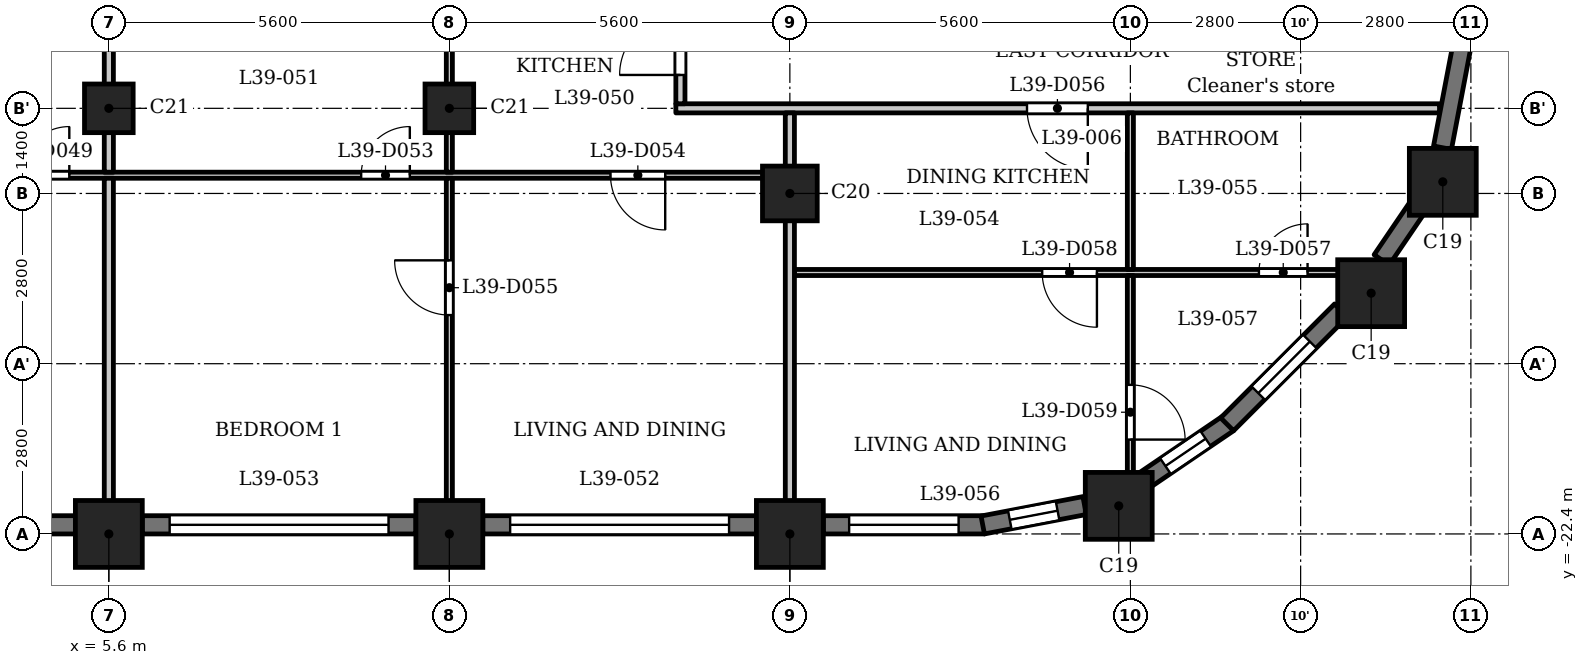
"""IFC4 building model, lengths in metres.
Left out: names, types, materials, properties, quantities, classifications, styles, units other than length and angle.
Written with IfcOpenShell. Run it as: python <this file> out.ifc"""

import sys

from ifc_helpers import new_model, si_unit, direction, frame, frame_2d, origin, origin_2d, place, context, subcontext, project, spatial, rectangle, extrude, element, fill, save


model = new_model("IFC4")
c1 = context("Model", 3, precision=1e-05, world=origin(), true_north=direction((0.0, 1.0)))
c2 = subcontext(c1, "Body", "Model", "MODEL_VIEW")
j1 = project(units=[si_unit("LENGTHUNIT", "METRE"), si_unit("PLANEANGLEUNIT", "RADIAN")], contexts=[c1])
p1 = place(None, origin())
s1 = spatial("IfcSite", under=j1, at=p1, CompositionType="ELEMENT")
p2 = place(p1, origin())
s2 = spatial("IfcBuilding", under=s1, at=p2, CompositionType="ELEMENT")
p3 = place(p2, frame((0.0, 0.0, 153.6)))
s3 = spatial("IfcBuildingStorey", under=s2, at=p3, CompositionType="ELEMENT", Elevation=153.6)
for number, where, z_axis, x_axis in (
    (1, (5.6, -22.4, 0.0), (0.0, 0.0, 1.0), (1.0, 0.0, 0.0)),
    (2, (11.2, -22.4, 0.0), (0.0, 0.0, 1.0), (1.0, 0.0, 0.0)),
    (3, (16.8, -22.4, 0.0), (0.0, 0.0, 1.0), (1.0, 0.0, 0.0)),
    (4, (22.209, -21.938, 0.0), (0.0, 0.0, 1.0), (1.0, 0.0, 0.0)),
    (5, (26.36, -18.44, 0.0), (0.0, 0.0, 1.0), (1.0, 0.0, 0.0)),
    (6, (27.538, -16.609, 0.0), (0.0, 0.0, 1.0), (1.0, 0.0, 0.0)),
):
    element("IfcColumn", number, at=place(p3, frame(where, z_axis=z_axis, x_axis=x_axis)), inside=s3, PredefinedType="COLUMN", context=c2, shape_type="SweptSolid", body=[
        extrude(rectangle(XDim=1.1, YDim=1.1, at=origin_2d()), origin(), (0.0, 0.0, 1.0), 3.5),
    ])
p4 = place(p3, frame((16.8, -16.8, 0.0), z_axis=(0.0, 0.0, 1.0), x_axis=(1.0, 0.0, 0.0)))
e7 = element("IfcColumn", 7, at=p4, inside=s3, PredefinedType="COLUMN", context=c2, shape_type="SweptSolid", body=[
    extrude(rectangle(XDim=0.9, YDim=0.9, at=origin_2d()), origin(), (0.0, 0.0, 1.0), 3.5),
])
for number, where, z_axis, x_axis in (
    (8, (5.6, -15.4, 0.0), (0.0, 0.0, 1.0), (1.0, 0.0, 0.0)),
    (9, (11.2, -15.4, 0.0), (0.0, 0.0, 1.0), (1.0, 0.0, 0.0)),
):
    element("IfcColumn", number, at=place(p3, frame(where, z_axis=z_axis, x_axis=x_axis)), inside=s3, PredefinedType="COLUMN", context=c2, shape_type="SweptSolid", body=[
        extrude(rectangle(XDim=0.8, YDim=0.8, at=origin_2d()), origin(), (0.0, 0.0, 1.0), 3.5),
    ])
p5 = place(p3, frame((0.55, -22.25, 0.0), z_axis=(0.0, 0.0, 1.0), x_axis=(1.0, 0.0, 0.0)))
e10 = element("IfcWall", 10, at=p5, inside=s3, PredefinedType="SOLIDWALL", context=c2, shape_type="SweptSolid", body=[
    extrude(rectangle(XDim=4.5, YDim=0.3, at=frame_2d((2.25, 0.0))), origin(), (0.0, 0.0, 1.0), 2.45),
])
p6 = place(p5, frame((0.45, 0.0, 1.2)))
e11 = element("IfcOpeningElement", 11, at=p6, cuts=e10, PredefinedType="OPENING", context=c2, shape_type="SweptSolid", body=[
    extrude(rectangle(XDim=3.6, YDim=0.95, at=frame_2d((1.8, 0.475))), frame((0.0, 0.16, 0.0), z_axis=(0.0, -1.0, 0.0), x_axis=(1.0, 0.0, 0.0)), (0.0, 0.0, 1.0), 0.32),
])
p7 = place(p3, frame((6.15, -22.25, 0.0), z_axis=(0.0, 0.0, 1.0), x_axis=(1.0, 0.0, 0.0)))
e12 = element("IfcWall", 12, at=p7, inside=s3, PredefinedType="SOLIDWALL", context=c2, shape_type="SweptSolid", body=[
    extrude(rectangle(XDim=4.5, YDim=0.3, at=frame_2d((2.25, 0.0))), origin(), (0.0, 0.0, 1.0), 2.45),
])
p8 = place(p7, frame((0.45, 0.0, 1.2)))
e13 = element("IfcOpeningElement", 13, at=p8, cuts=e12, PredefinedType="OPENING", context=c2, shape_type="SweptSolid", body=[
    extrude(rectangle(XDim=3.6, YDim=0.95, at=frame_2d((1.8, 0.475))), frame((0.0, 0.16, 0.0), z_axis=(0.0, -1.0, 0.0), x_axis=(1.0, 0.0, 0.0)), (0.0, 0.0, 1.0), 0.32),
])
p9 = place(p3, frame((11.75, -22.25, 0.0), z_axis=(0.0, 0.0, 1.0), x_axis=(1.0, 0.0, 0.0)))
e14 = element("IfcWall", 14, at=p9, inside=s3, PredefinedType="SOLIDWALL", context=c2, shape_type="SweptSolid", body=[
    extrude(rectangle(XDim=4.5, YDim=0.3, at=frame_2d((2.25, 0.0))), origin(), (0.0, 0.0, 1.0), 2.45),
])
p10 = place(p9, frame((0.45, 0.0, 1.2)))
e15 = element("IfcOpeningElement", 15, at=p10, cuts=e14, PredefinedType="OPENING", context=c2, shape_type="SweptSolid", body=[
    extrude(rectangle(XDim=3.6, YDim=0.95, at=frame_2d((1.8, 0.475))), frame((0.0, 0.16, 0.0), z_axis=(0.0, -1.0, 0.0), x_axis=(1.0, 0.0, 0.0)), (0.0, 0.0, 1.0), 0.32),
])
p11 = place(p3, frame((17.35, -22.25, 0.0), z_axis=(0.0, 0.0, 1.0), x_axis=(1.0, 0.0, 0.0)))
e16 = element("IfcWall", 16, at=p11, inside=s3, PredefinedType="SOLIDWALL", context=c2, shape_type="SweptSolid", body=[
    extrude(rectangle(XDim=2.65, YDim=0.3, at=frame_2d((1.325, 0.0))), origin(), (0.0, 0.0, 1.0), 2.45),
])
p12 = place(p11, frame((0.425, 0.0, 0.9)))
e17 = element("IfcOpeningElement", 17, at=p12, cuts=e16, PredefinedType="OPENING", context=c2, shape_type="SweptSolid", body=[
    extrude(rectangle(XDim=1.8, YDim=1.25, at=frame_2d((0.9, 0.625))), frame((0.0, 0.16, 0.0), z_axis=(0.0, -1.0, 0.0), x_axis=(1.0, 0.0, 0.0)), (0.0, 0.0, 1.0), 0.32),
])
p13 = place(p3, frame((19.972, -22.253, 0.0), z_axis=(0.0, 0.0, 1.0), x_axis=(0.982297206936, 0.187329114784, 0.0)))
e18 = element("IfcWall", 18, at=p13, inside=s3, PredefinedType="SOLIDWALL", context=c2, shape_type="SweptSolid", body=[
    extrude(rectangle(XDim=1.706, YDim=0.3, at=frame_2d((0.853, 0.0))), origin(), (0.0, 0.0, 1.0), 2.45),
])
p14 = place(p13, frame((0.453, 0.0, 0.6)))
e19 = element("IfcOpeningElement", 19, at=p14, cuts=e18, PredefinedType="OPENING", context=c2, shape_type="SweptSolid", body=[
    extrude(rectangle(XDim=0.8, YDim=1.55, at=frame_2d((0.4, 0.775))), frame((0.0, 0.16, 0.0), z_axis=(0.0, -1.0, 0.0), x_axis=(1.0, 0.0, 0.0)), (0.0, 0.0, 1.0), 0.32),
])
p15 = place(p3, frame((22.602, -21.538, 0.0), z_axis=(0.0, 0.0, 1.0), x_axis=(0.827040942766, 0.562141689424, 0.0)))
e20 = element("IfcWall", 20, at=p15, inside=s3, PredefinedType="SOLIDWALL", context=c2, shape_type="SweptSolid", body=[
    extrude(rectangle(XDim=1.706, YDim=0.3, at=frame_2d((0.853, 0.0))), origin(), (0.0, 0.0, 1.0), 2.45),
])
p16 = place(p15, frame((0.453, 0.0, 0.6)))
e21 = element("IfcOpeningElement", 21, at=p16, cuts=e20, PredefinedType="OPENING", context=c2, shape_type="SweptSolid", body=[
    extrude(rectangle(XDim=0.8, YDim=1.55, at=frame_2d((0.4, 0.775))), frame((0.0, 0.16, 0.0), z_axis=(0.0, -1.0, 0.0), x_axis=(1.0, 0.0, 0.0)), (0.0, 0.0, 1.0), 0.32),
])
p17 = place(p3, frame((23.991, -20.597, 0.0), z_axis=(0.0, 0.0, 1.0), x_axis=(0.707106781187, 0.707106781187, 0.0)))
e22 = element("IfcWall", 22, at=p17, inside=s3, PredefinedType="SOLIDWALL", context=c2, shape_type="SweptSolid", body=[
    extrude(rectangle(XDim=2.65, YDim=0.3, at=frame_2d((1.325, 0.0))), origin(), (0.0, 0.0, 1.0), 2.45),
])
p18 = place(p17, frame((0.725, 0.0, 0.6)))
e23 = element("IfcOpeningElement", 23, at=p18, cuts=e22, PredefinedType="OPENING", context=c2, shape_type="SweptSolid", body=[
    extrude(rectangle(XDim=1.2, YDim=1.55, at=frame_2d((0.6, 0.775))), frame((0.0, 0.16, 0.0), z_axis=(0.0, -1.0, 0.0), x_axis=(1.0, 0.0, 0.0)), (0.0, 0.0, 1.0), 0.32),
])
p19 = place(p3, frame((26.532, -17.893, 0.0), z_axis=(0.0, 0.0, 1.0), x_axis=(0.562105419172, 0.82706559458, 0.0)))
e24 = element("IfcWall", 24, at=p19, inside=s3, PredefinedType="SOLIDWALL", context=c2, shape_type="SweptSolid", body=[
    extrude(rectangle(XDim=1.077, YDim=0.3, at=frame_2d((0.539, 0.0))), origin(), (0.0, 0.0, 1.0), 3.2),
])
p20 = place(p3, frame((27.533, -16.048, 0.0), z_axis=(0.0, 0.0, 1.0), x_axis=(0.187302784601, 0.982302227871, 0.0)))
e25 = element("IfcWall", 25, at=p20, inside=s3, PredefinedType="SOLIDWALL", context=c2, shape_type="SweptSolid", body=[
    extrude(rectangle(XDim=1.706, YDim=0.3, at=frame_2d((0.853, 0.0))), origin(), (0.0, 0.0, 1.0), 2.45),
])
p21 = place(p3, frame((16.875, -18.1, 0.0), z_axis=(0.0, 0.0, 1.0), x_axis=(1.0, 0.0, 0.0)))
e26 = element("IfcWall", 26, at=p21, inside=s3, PredefinedType="PARTITIONING", context=c2, shape_type="SweptSolid", body=[
    extrude(rectangle(XDim=9.565, YDim=0.1, at=frame_2d((4.782, 0.0))), origin(), (0.0, 0.0, 1.0), 3.2),
])
p22 = place(p21, frame((7.639, 0.0, 0.0)))
e27 = element("IfcOpeningElement", 27, at=p22, cuts=e26, PredefinedType="OPENING", context=c2, shape_type="SweptSolid", body=[
    extrude(rectangle(XDim=0.8, YDim=2.1, at=frame_2d((0.4, 1.05))), frame((0.0, 0.06, 0.0), z_axis=(0.0, -1.0, 0.0), x_axis=(1.0, 0.0, 0.0)), (0.0, 0.0, 1.0), 0.12),
])
p23 = place(p21, frame((4.075, 0.0, 0.0)))
e28 = element("IfcOpeningElement", 28, at=p23, cuts=e26, PredefinedType="OPENING", context=c2, shape_type="SweptSolid", body=[
    extrude(rectangle(XDim=0.9, YDim=2.1, at=frame_2d((0.45, 1.05))), frame((0.0, 0.06, 0.0), z_axis=(0.0, -1.0, 0.0), x_axis=(1.0, 0.0, 0.0)), (0.0, 0.0, 1.0), 0.12),
])
p24 = place(p3, frame((-16.725, -16.5, 0.0), z_axis=(0.0, 0.0, 1.0), x_axis=(1.0, 0.0, 0.0)))
e29 = element("IfcWall", 29, at=p24, inside=s3, PredefinedType="PARTITIONING", context=c2, shape_type="SweptSolid", body=[
    extrude(rectangle(XDim=33.45, YDim=0.1, at=frame_2d((16.725, 0.0))), origin(), (0.0, 0.0, 1.0), 3.2),
])
p25 = place(p24, frame((9.675, 0.0, 0.0)))
e30 = element("IfcOpeningElement", 30, at=p25, cuts=e29, PredefinedType="OPENING", context=c2, shape_type="SweptSolid", body=[
    extrude(rectangle(XDim=0.8, YDim=2.1, at=frame_2d((0.4, 1.05))), frame((0.0, 0.06, 0.0), z_axis=(0.0, -1.0, 0.0), x_axis=(1.0, 0.0, 0.0)), (0.0, 0.0, 1.0), 0.12),
])
p26 = place(p24, frame((4.075, 0.0, 0.0)))
e31 = element("IfcOpeningElement", 31, at=p26, cuts=e29, PredefinedType="OPENING", context=c2, shape_type="SweptSolid", body=[
    extrude(rectangle(XDim=0.9, YDim=2.1, at=frame_2d((0.45, 1.05))), frame((0.0, 0.06, 0.0), z_axis=(0.0, -1.0, 0.0), x_axis=(1.0, 0.0, 0.0)), (0.0, 0.0, 1.0), 0.12),
])
p27 = place(p24, frame((20.875, 0.0, 0.0)))
e32 = element("IfcOpeningElement", 32, at=p27, cuts=e29, PredefinedType="OPENING", context=c2, shape_type="SweptSolid", body=[
    extrude(rectangle(XDim=0.8, YDim=2.1, at=frame_2d((0.4, 1.05))), frame((0.0, 0.06, 0.0), z_axis=(0.0, -1.0, 0.0), x_axis=(1.0, 0.0, 0.0)), (0.0, 0.0, 1.0), 0.12),
])
p28 = place(p24, frame((15.275, 0.0, 0.0)))
e33 = element("IfcOpeningElement", 33, at=p28, cuts=e29, PredefinedType="OPENING", context=c2, shape_type="SweptSolid", body=[
    extrude(rectangle(XDim=0.9, YDim=2.1, at=frame_2d((0.45, 1.05))), frame((0.0, 0.06, 0.0), z_axis=(0.0, -1.0, 0.0), x_axis=(1.0, 0.0, 0.0)), (0.0, 0.0, 1.0), 0.12),
])
p29 = place(p24, frame((26.475, 0.0, 0.0)))
e34 = element("IfcOpeningElement", 34, at=p29, cuts=e29, PredefinedType="OPENING", context=c2, shape_type="SweptSolid", body=[
    extrude(rectangle(XDim=0.8, YDim=2.1, at=frame_2d((0.4, 1.05))), frame((0.0, 0.06, 0.0), z_axis=(0.0, -1.0, 0.0), x_axis=(1.0, 0.0, 0.0)), (0.0, 0.0, 1.0), 0.12),
])
p30 = place(p24, frame((30.575, 0.0, 0.0)))
e35 = element("IfcOpeningElement", 35, at=p30, cuts=e29, PredefinedType="OPENING", context=c2, shape_type="SweptSolid", body=[
    extrude(rectangle(XDim=0.9, YDim=2.1, at=frame_2d((0.45, 1.05))), frame((0.0, 0.06, 0.0), z_axis=(0.0, -1.0, 0.0), x_axis=(1.0, 0.0, 0.0)), (0.0, 0.0, 1.0), 0.12),
])
p31 = place(p3, frame((14.925, -15.4, 0.0), z_axis=(0.0, 0.0, 1.0), x_axis=(1.0, 0.0, 0.0)))
e36 = element("IfcWall", 36, at=p31, inside=s3, PredefinedType="PARTITIONING", context=c2, shape_type="SweptSolid", body=[
    extrude(rectangle(XDim=12.559, YDim=0.15, at=frame_2d((6.279, 0.0))), origin(), (0.0, 0.0, 1.0), 3.2),
])
p32 = place(p31, frame((5.775, 0.0, 0.0)))
e37 = element("IfcOpeningElement", 37, at=p32, cuts=e36, PredefinedType="OPENING", context=c2, shape_type="SweptSolid", body=[
    extrude(rectangle(XDim=1.0, YDim=2.1, at=frame_2d((0.5, 1.05))), frame((0.0, 0.085, 0.0), z_axis=(0.0, -1.0, 0.0), x_axis=(1.0, 0.0, 0.0)), (0.0, 0.0, 1.0), 0.17),
])
p33 = place(p3, frame((5.6, -22.93, 0.0), z_axis=(0.0, 0.0, 1.0), x_axis=(0.0, 1.0, 0.0)))
e38 = element("IfcWall", 38, at=p33, inside=s3, PredefinedType="PARTITIONING", context=c2, shape_type="SweptSolid", body=[
    extrude(rectangle(XDim=6.38, YDim=0.15, at=frame_2d((3.19, 0.0))), origin(), (0.0, 0.0, 1.0), 3.2),
])
p34 = place(p3, frame((5.6, -16.45, 0.0), z_axis=(0.0, 0.0, 1.0), x_axis=(0.0, 1.0, 0.0)))
e39 = element("IfcWall", 39, at=p34, inside=s3, PredefinedType="PARTITIONING", context=c2, shape_type="SweptSolid", body=[
    extrude(rectangle(XDim=3.175, YDim=0.15, at=frame_2d((1.587, 0.0))), origin(), (0.0, 0.0, 1.0), 3.2),
])
p35 = place(p3, frame((11.2, -22.93, 0.0), z_axis=(0.0, 0.0, 1.0), x_axis=(0.0, 1.0, 0.0)))
e40 = element("IfcWall", 40, at=p35, inside=s3, PredefinedType="PARTITIONING", context=c2, shape_type="SweptSolid", body=[
    extrude(rectangle(XDim=6.38, YDim=0.1, at=frame_2d((3.19, 0.0))), origin(), (0.0, 0.0, 1.0), 3.2),
])
p36 = place(p35, frame((4.13, 0.0, 0.0)))
e41 = element("IfcOpeningElement", 41, at=p36, cuts=e40, PredefinedType="OPENING", context=c2, shape_type="SweptSolid", body=[
    extrude(rectangle(XDim=0.9, YDim=2.1, at=frame_2d((0.45, 1.05))), frame((0.0, 0.06, 0.0), z_axis=(0.0, -1.0, 0.0), x_axis=(1.0, 0.0, 0.0)), (0.0, 0.0, 1.0), 0.12),
])
p37 = place(p3, frame((11.2, -16.45, 0.0), z_axis=(0.0, 0.0, 1.0), x_axis=(0.0, 1.0, 0.0)))
e42 = element("IfcWall", 42, at=p37, inside=s3, PredefinedType="PARTITIONING", context=c2, shape_type="SweptSolid", body=[
    extrude(rectangle(XDim=3.175, YDim=0.1, at=frame_2d((1.587, 0.0))), origin(), (0.0, 0.0, 1.0), 3.2),
])
p38 = place(p3, frame((15.0, -15.325, 0.0), z_axis=(0.0, 0.0, 1.0), x_axis=(0.0, 1.0, 0.0)))
e43 = element("IfcWall", 43, at=p38, inside=s3, PredefinedType="PARTITIONING", context=c2, shape_type="SweptSolid", body=[
    extrude(rectangle(XDim=2.05, YDim=0.15, at=frame_2d((1.025, 0.0))), origin(), (0.0, 0.0, 1.0), 3.2),
])
p39 = place(p38, frame((0.474, 0.0, 0.0)))
e44 = element("IfcOpeningElement", 44, at=p39, cuts=e43, PredefinedType="OPENING", context=c2, shape_type="SweptSolid", body=[
    extrude(rectangle(XDim=1.0, YDim=2.1, at=frame_2d((0.5, 1.05))), frame((0.0, 0.085, 0.0), z_axis=(0.0, -1.0, 0.0), x_axis=(1.0, 0.0, 0.0)), (0.0, 0.0, 1.0), 0.17),
])
p40 = place(p3, frame((16.8, -22.93, 0.0), z_axis=(0.0, 0.0, 1.0), x_axis=(0.0, 1.0, 0.0)))
e45 = element("IfcWall", 45, at=p40, inside=s3, PredefinedType="PARTITIONING", context=c2, shape_type="SweptSolid", body=[
    extrude(rectangle(XDim=7.455, YDim=0.15, at=frame_2d((3.728, 0.0))), origin(), (0.0, 0.0, 1.0), 3.2),
])
p41 = place(p3, frame((22.4, -21.72, 0.0), z_axis=(0.0, 0.0, 1.0), x_axis=(0.0, 1.0, 0.0)))
e46 = element("IfcWall", 46, at=p41, inside=s3, PredefinedType="PARTITIONING", context=c2, shape_type="SweptSolid", body=[
    extrude(rectangle(XDim=3.57, YDim=0.1, at=frame_2d((1.785, 0.0))), origin(), (0.0, 0.0, 1.0), 3.2),
])
p42 = place(p41, frame((0.872, 0.0, 0.0)))
e47 = element("IfcOpeningElement", 47, at=p42, cuts=e46, PredefinedType="OPENING", context=c2, shape_type="SweptSolid", body=[
    extrude(rectangle(XDim=0.9, YDim=2.1, at=frame_2d((0.45, 1.05))), frame((0.0, 0.06, 0.0), z_axis=(0.0, -1.0, 0.0), x_axis=(1.0, 0.0, 0.0)), (0.0, 0.0, 1.0), 0.12),
])
p43 = place(p3, frame((22.4, -18.05, 0.0), z_axis=(0.0, 0.0, 1.0), x_axis=(0.0, 1.0, 0.0)))
e48 = element("IfcWall", 48, at=p43, inside=s3, PredefinedType="PARTITIONING", context=c2, shape_type="SweptSolid", body=[
    extrude(rectangle(XDim=2.575, YDim=0.1, at=frame_2d((1.288, 0.0))), origin(), (0.0, 0.0, 1.0), 3.2),
])
p44 = place(p27, origin())
e49 = element("IfcDoor", 49, at=p44, inside=s3, OperationType="SINGLE_SWING_LEFT", PredefinedType="DOOR", context=c2, shape_type="SweptSolid", body=[
    extrude(rectangle(XDim=0.8, YDim=2.1, at=frame_2d((0.4, 1.05))), frame((0.0, 0.025, 0.0), z_axis=(0.0, -1.0, 0.0), x_axis=(1.0, 0.0, 0.0)), (0.0, 0.0, 1.0), 0.05),
])
fill(e32, e49)
p45 = place(p39, origin())
e50 = element("IfcDoor", 50, at=p45, inside=s3, OperationType="SINGLE_SWING_RIGHT", PredefinedType="DOOR", context=c2, shape_type="SweptSolid", body=[
    extrude(rectangle(XDim=1.0, YDim=2.1, at=frame_2d((0.5, 1.05))), frame((0.0, 0.025, 0.0), z_axis=(0.0, -1.0, 0.0), x_axis=(1.0, 0.0, 0.0)), (0.0, 0.0, 1.0), 0.05),
])
fill(e44, e50)
p46 = place(p29, origin())
e51 = element("IfcDoor", 51, at=p46, inside=s3, OperationType="SINGLE_SWING_LEFT", PredefinedType="DOOR", context=c2, shape_type="SweptSolid", body=[
    extrude(rectangle(XDim=0.8, YDim=2.1, at=frame_2d((0.4, 1.05))), frame((0.0, 0.025, 0.0), z_axis=(0.0, -1.0, 0.0), x_axis=(1.0, 0.0, 0.0)), (0.0, 0.0, 1.0), 0.05),
])
fill(e34, e51)
p47 = place(p30, origin())
e52 = element("IfcDoor", 52, at=p47, inside=s3, OperationType="SINGLE_SWING_RIGHT", PredefinedType="DOOR", context=c2, shape_type="SweptSolid", body=[
    extrude(rectangle(XDim=0.9, YDim=2.1, at=frame_2d((0.45, 1.05))), frame((0.0, 0.025, 0.0), z_axis=(0.0, -1.0, 0.0), x_axis=(1.0, 0.0, 0.0)), (0.0, 0.0, 1.0), 0.05),
])
fill(e35, e52)
p48 = place(p36, origin())
e53 = element("IfcDoor", 53, at=p48, inside=s3, OperationType="SINGLE_SWING_LEFT", PredefinedType="DOOR", context=c2, shape_type="SweptSolid", body=[
    extrude(rectangle(XDim=0.9, YDim=2.1, at=frame_2d((0.45, 1.05))), frame((0.0, 0.025, 0.0), z_axis=(0.0, -1.0, 0.0), x_axis=(1.0, 0.0, 0.0)), (0.0, 0.0, 1.0), 0.05),
])
fill(e41, e53)
p49 = place(p32, origin())
e54 = element("IfcDoor", 54, at=p49, inside=s3, OperationType="SINGLE_SWING_RIGHT", PredefinedType="DOOR", context=c2, shape_type="SweptSolid", body=[
    extrude(rectangle(XDim=1.0, YDim=2.1, at=frame_2d((0.5, 1.05))), frame((0.0, 0.025, 0.0), z_axis=(0.0, -1.0, 0.0), x_axis=(1.0, 0.0, 0.0)), (0.0, 0.0, 1.0), 0.05),
])
fill(e37, e54)
p50 = place(p22, origin())
e55 = element("IfcDoor", 55, at=p50, inside=s3, OperationType="SINGLE_SWING_LEFT", PredefinedType="DOOR", context=c2, shape_type="SweptSolid", body=[
    extrude(rectangle(XDim=0.8, YDim=2.1, at=frame_2d((0.4, 1.05))), frame((0.0, 0.025, 0.0), z_axis=(0.0, -1.0, 0.0), x_axis=(1.0, 0.0, 0.0)), (0.0, 0.0, 1.0), 0.05),
])
fill(e27, e55)
p51 = place(p23, origin())
e56 = element("IfcDoor", 56, at=p51, inside=s3, OperationType="SINGLE_SWING_RIGHT", PredefinedType="DOOR", context=c2, shape_type="SweptSolid", body=[
    extrude(rectangle(XDim=0.9, YDim=2.1, at=frame_2d((0.45, 1.05))), frame((0.0, 0.025, 0.0), z_axis=(0.0, -1.0, 0.0), x_axis=(1.0, 0.0, 0.0)), (0.0, 0.0, 1.0), 0.05),
])
fill(e28, e56)
p52 = place(p42, origin())
e57 = element("IfcDoor", 57, at=p52, inside=s3, OperationType="SINGLE_SWING_LEFT", PredefinedType="DOOR", context=c2, shape_type="SweptSolid", body=[
    extrude(rectangle(XDim=0.9, YDim=2.1, at=frame_2d((0.45, 1.05))), frame((0.0, 0.025, 0.0), z_axis=(0.0, -1.0, 0.0), x_axis=(1.0, 0.0, 0.0)), (0.0, 0.0, 1.0), 0.05),
])
fill(e47, e57)
p53 = place(p8, origin())
e58 = element("IfcWindow", 58, at=p53, inside=s3, PartitioningType="SINGLE_PANEL", PredefinedType="WINDOW", context=c2, shape_type="SweptSolid", body=[
    extrude(rectangle(XDim=3.6, YDim=0.95, at=frame_2d((1.8, 0.475))), frame((0.0, 0.03, 0.0), z_axis=(0.0, -1.0, 0.0), x_axis=(1.0, 0.0, 0.0)), (0.0, 0.0, 1.0), 0.06),
])
fill(e13, e58)
p54 = place(p10, origin())
e59 = element("IfcWindow", 59, at=p54, inside=s3, PartitioningType="SINGLE_PANEL", PredefinedType="WINDOW", context=c2, shape_type="SweptSolid", body=[
    extrude(rectangle(XDim=3.6, YDim=0.95, at=frame_2d((1.8, 0.475))), frame((0.0, 0.03, 0.0), z_axis=(0.0, -1.0, 0.0), x_axis=(1.0, 0.0, 0.0)), (0.0, 0.0, 1.0), 0.06),
])
fill(e15, e59)
p55 = place(p12, origin())
e60 = element("IfcWindow", 60, at=p55, inside=s3, PartitioningType="SINGLE_PANEL", PredefinedType="WINDOW", context=c2, shape_type="SweptSolid", body=[
    extrude(rectangle(XDim=1.8, YDim=1.25, at=frame_2d((0.9, 0.625))), frame((0.0, 0.03, 0.0), z_axis=(0.0, -1.0, 0.0), x_axis=(1.0, 0.0, 0.0)), (0.0, 0.0, 1.0), 0.06),
])
fill(e17, e60)
p56 = place(p14, origin())
e61 = element("IfcWindow", 61, at=p56, inside=s3, PartitioningType="SINGLE_PANEL", PredefinedType="WINDOW", context=c2, shape_type="SweptSolid", body=[
    extrude(rectangle(XDim=0.8, YDim=1.55, at=frame_2d((0.4, 0.775))), frame((0.0, 0.03, 0.0), z_axis=(0.0, -1.0, 0.0), x_axis=(1.0, 0.0, 0.0)), (0.0, 0.0, 1.0), 0.06),
])
fill(e19, e61)
p57 = place(p16, origin())
e62 = element("IfcWindow", 62, at=p57, inside=s3, PartitioningType="SINGLE_PANEL", PredefinedType="WINDOW", context=c2, shape_type="SweptSolid", body=[
    extrude(rectangle(XDim=0.8, YDim=1.55, at=frame_2d((0.4, 0.775))), frame((0.0, 0.03, 0.0), z_axis=(0.0, -1.0, 0.0), x_axis=(1.0, 0.0, 0.0)), (0.0, 0.0, 1.0), 0.06),
])
fill(e21, e62)
p58 = place(p18, origin())
e63 = element("IfcWindow", 63, at=p58, inside=s3, PartitioningType="SINGLE_PANEL", PredefinedType="WINDOW", context=c2, shape_type="SweptSolid", body=[
    extrude(rectangle(XDim=1.2, YDim=1.55, at=frame_2d((0.6, 0.775))), frame((0.0, 0.03, 0.0), z_axis=(0.0, -1.0, 0.0), x_axis=(1.0, 0.0, 0.0)), (0.0, 0.0, 1.0), 0.06),
])
fill(e23, e63)
save(model, sys.argv[1])
